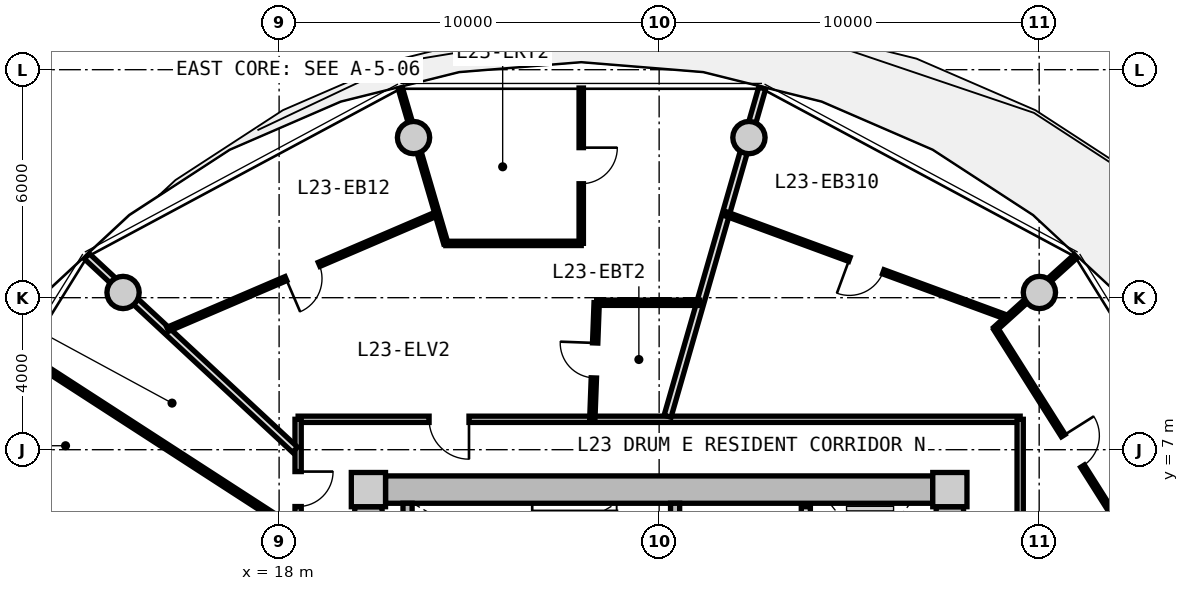
"""IFC4 building model, lengths in metres.
Left out: names, types, materials, properties, quantities, classifications, styles, units other than length and angle.
Written with IfcOpenShell. Run it as: python <this file> out.ifc"""

import sys

from ifc_helpers import new_model, si_unit, direction, frame, frame_2d, origin, origin_2d, place, context, subcontext, project, spatial, rectangle, circle, extrude, source, transform, mapped, element, fill, save


model = new_model("IFC4")
c1 = context("Model", 3, precision=1e-05, world=origin(), true_north=direction((0.0, 1.0)))
c2 = subcontext(c1, "Body", "Model", "MODEL_VIEW")
j1 = project(units=[si_unit("LENGTHUNIT", "METRE"), si_unit("PLANEANGLEUNIT", "RADIAN")], contexts=[c1])
p1 = place(None, origin())
s1 = spatial("IfcSite", under=j1, at=p1, CompositionType="ELEMENT")
p2 = place(p1, origin())
s2 = spatial("IfcBuilding", under=s1, at=p2, CompositionType="ELEMENT")
p3 = place(p2, frame((0.0, 0.0, 77.95)))
s3 = spatial("IfcBuildingStorey", under=s2, at=p3, CompositionType="ELEMENT", Elevation=77.95)
m1 = source(origin(), c2, "Body", "SweptSolid", [
    extrude(rectangle(XDim=0.9, YDim=0.9, at=origin_2d()), origin(), (0.0, 0.0, 1.0), 3.05),
])
for number, where, z_axis, x_axis in (
    (1, (35.65, 5.95, 0.0), (0.0, 0.0, 1.0), (1.0, 0.0, 0.0)),
    (2, (20.35, 5.95, 0.0), (0.0, 0.0, 1.0), (1.0, 0.0, 0.0)),
):
    element("IfcColumn", number, at=place(p3, frame(where, z_axis=z_axis, x_axis=x_axis)), inside=s3, PredefinedType="COLUMN", context=c2, shape_type="MappedRepresentation", body=[
        mapped(m1, transform((0.0, 0.0, 0.0), x_axis=(1.0, 0.0, 0.0), y_axis=(0.0, 1.0, 0.0), z_axis=(0.0, 0.0, 1.0), scale=1.0)),
    ])
m2 = source(origin(), c2, "Body", "SweptSolid", [
    extrude(rectangle(XDim=14.4, YDim=0.72, at=frame_2d((7.2, 0.0))), origin(), (0.0, 0.0, 1.0), 2.79),
])
p4 = place(p3, frame((20.8, 5.95, 0.0), z_axis=(0.0, 0.0, 1.0), x_axis=(1.0, 0.0, 0.0)))
e3 = element("IfcWall", 3, at=p4, inside=s3, PredefinedType="SHEAR", context=c2, shape_type="MappedRepresentation", body=[
    mapped(m2, transform((0.0, 0.0, 0.0), x_axis=(1.0, 0.0, 0.0), y_axis=(0.0, 1.0, 0.0), z_axis=(0.0, 0.0, 1.0), scale=1.0)),
])
m3 = source(origin(), c2, "Body", "SweptSolid", [
    extrude(rectangle(XDim=11.0, YDim=0.72, at=frame_2d((5.5, 0.0))), origin(), (0.0, 0.0, 1.0), 2.79),
])
p5 = place(p3, frame((20.35, -5.5, 0.0), z_axis=(0.0, 0.0, 1.0), x_axis=(0.0, 1.0, 0.0)))
e4 = element("IfcWall", 4, at=p5, inside=s3, PredefinedType="SHEAR", context=c2, shape_type="MappedRepresentation", body=[
    mapped(m3, transform((0.0, 0.0, 0.0), x_axis=(1.0, 0.0, 0.0), y_axis=(0.0, 1.0, 0.0), z_axis=(0.0, 0.0, 1.0), scale=1.0)),
])
p6 = place(p5, frame((3.8, 0.0, 0.0)))
e5 = element("IfcOpeningElement", 5, at=p6, cuts=e4, PredefinedType="OPENING", context=c2, shape_type="SweptSolid", body=[
    extrude(rectangle(XDim=1.2, YDim=2.15, at=frame_2d((0.6, 1.075))), frame((0.0, 0.37, 0.0), z_axis=(0.0, -1.0, 0.0), x_axis=(1.0, 0.0, 0.0)), (0.0, 0.0, 1.0), 0.74),
])
p7 = place(p3, frame((35.65, 5.5, 0.0), z_axis=(0.0, 0.0, 1.0), x_axis=(0.0, -1.0, 0.0)))
e6 = element("IfcWall", 6, at=p7, inside=s3, PredefinedType="SHEAR", context=c2, shape_type="MappedRepresentation", body=[
    mapped(m3, transform((0.0, 0.0, 0.0), x_axis=(1.0, 0.0, 0.0), y_axis=(0.0, 1.0, 0.0), z_axis=(0.0, 0.0, 1.0), scale=1.0)),
])
p8 = place(p7, frame((5.65, 0.0, 0.0)))
e7 = element("IfcOpeningElement", 7, at=p8, cuts=e6, PredefinedType="OPENING", context=c2, shape_type="SweptSolid", body=[
    extrude(rectangle(XDim=1.2, YDim=2.15, at=frame_2d((0.6, 1.075))), frame((0.0, 0.37, 0.0), z_axis=(0.0, -1.0, 0.0), x_axis=(1.0, 0.0, 0.0)), (0.0, 0.0, 1.0), 0.74),
])
p9 = place(p7, frame((9.3, 0.0, 0.0)))
e8 = element("IfcOpeningElement", 8, at=p9, cuts=e6, PredefinedType="OPENING", context=c2, shape_type="SweptSolid", body=[
    extrude(rectangle(XDim=1.0, YDim=2.1, at=frame_2d((0.5, 1.05))), frame((0.0, 0.37, 0.0), z_axis=(0.0, -1.0, 0.0), x_axis=(1.0, 0.0, 0.0)), (0.0, 0.0, 1.0), 0.74),
])
m4 = source(origin(), c2, "Body", "SweptSolid", [
    extrude(circle(Radius=0.425, at=origin_2d()), origin(), (0.0, 0.0, 1.0), 3.47),
])
for number, where, z_axis, x_axis in (
    (9, (38.006, 11.137, -0.42), (0.0, 0.0, 1.0), (1.0, 0.0, 0.0)),
    (10, (30.363, 15.213, -0.42), (0.0, 0.0, 1.0), (1.0, 0.0, 0.0)),
    (11, (21.537, 15.213, -0.42), (0.0, 0.0, 1.0), (1.0, 0.0, 0.0)),
    (12, (13.894, 11.137, -0.42), (0.0, 0.0, 1.0), (1.0, 0.0, 0.0)),
):
    element("IfcColumn", number, at=place(p3, frame(where, z_axis=z_axis, x_axis=x_axis)), inside=s3, PredefinedType="COLUMN", context=c2, shape_type="MappedRepresentation", body=[
        mapped(m4, transform((0.0, 0.0, 0.0), x_axis=(1.0, 0.0, 0.0), y_axis=(0.0, 1.0, 0.0), z_axis=(0.0, 0.0, 1.0), scale=1.0)),
    ])
m5 = source(origin(), c2, "Body", "SweptSolid", [
    extrude(rectangle(XDim=3.14, YDim=0.24, at=frame_2d((1.57, 0.0))), origin(), (0.0, 0.0, 1.0), 2.79),
])
p10 = place(p3, frame((21.38, 2.45, 0.0), z_axis=(0.0, 0.0, 1.0), x_axis=(0.0, 1.0, 0.0)))
e13 = element("IfcWall", 13, at=p10, inside=s3, PredefinedType="PARTITIONING", context=c2, shape_type="MappedRepresentation", body=[
    mapped(m5, transform((0.0, 0.0, 0.0), x_axis=(1.0, 0.0, 0.0), y_axis=(0.0, 1.0, 0.0), z_axis=(0.0, 0.0, 1.0), scale=1.0)),
])
p11 = place(p3, frame((28.42, 2.45, 0.0), z_axis=(0.0, 0.0, 1.0), x_axis=(0.0, 1.0, 0.0)))
e14 = element("IfcWall", 14, at=p11, inside=s3, PredefinedType="PARTITIONING", context=c2, shape_type="MappedRepresentation", body=[
    mapped(m5, transform((0.0, 0.0, 0.0), x_axis=(1.0, 0.0, 0.0), y_axis=(0.0, 1.0, 0.0), z_axis=(0.0, 0.0, 1.0), scale=1.0)),
])
p12 = place(p11, frame((0.55, 0.0, 0.0)))
e15 = element("IfcOpeningElement", 15, at=p12, cuts=e14, PredefinedType="OPENING", context=c2, shape_type="SweptSolid", body=[
    extrude(rectangle(XDim=1.1, YDim=2.15, at=frame_2d((0.55, 1.075))), frame((0.0, 0.13, 0.0), z_axis=(0.0, -1.0, 0.0), x_axis=(1.0, 0.0, 0.0)), (0.0, 0.0, 1.0), 0.26),
])
m6 = source(origin(), c2, "Body", "SweptSolid", [
    extrude(rectangle(XDim=5.0, YDim=0.24, at=frame_2d((2.5, 0.0))), origin(), (0.0, 0.0, 1.0), 2.775),
])
p13 = place(p3, frame((31.86, 0.5, 0.0), z_axis=(0.0, 0.0, 1.0), x_axis=(0.0, 1.0, 0.0)))
e16 = element("IfcWall", 16, at=p13, inside=s3, PredefinedType="PARTITIONING", context=c2, shape_type="MappedRepresentation", body=[
    mapped(m6, transform((0.0, 0.0, 0.0), x_axis=(1.0, 0.0, 0.0), y_axis=(0.0, 1.0, 0.0), z_axis=(0.0, 0.0, 1.0), scale=1.0)),
])
p14 = place(p13, frame((3.05, 0.0, 0.0)))
e17 = element("IfcOpeningElement", 17, at=p14, cuts=e16, PredefinedType="OPENING", context=c2, shape_type="SweptSolid", body=[
    extrude(rectangle(XDim=1.3, YDim=2.2, at=frame_2d((0.65, 1.1))), frame((0.0, 0.13, 0.0), z_axis=(0.0, -1.0, 0.0), x_axis=(1.0, 0.0, 0.0)), (0.0, 0.0, 1.0), 0.26),
])
p15 = place(p13, frame((0.55, 0.0, 0.0)))
e18 = element("IfcOpeningElement", 18, at=p15, cuts=e16, PredefinedType="OPENING", context=c2, shape_type="SweptSolid", body=[
    extrude(rectangle(XDim=1.3, YDim=2.2, at=frame_2d((0.65, 1.1))), frame((0.0, 0.13, 0.0), z_axis=(0.0, -1.0, 0.0), x_axis=(1.0, 0.0, 0.0)), (0.0, 0.0, 1.0), 0.26),
])
m7 = source(origin(), c2, "Body", "SweptSolid", [
    extrude(rectangle(XDim=19.0, YDim=0.165, at=frame_2d((9.5, 0.0))), origin(), (0.0, 0.0, 1.0), 2.775),
])
p16 = place(p3, frame((18.5, 7.8, 0.0), z_axis=(0.0, 0.0, 1.0), x_axis=(1.0, 0.0, 0.0)))
e19 = element("IfcWall", 19, at=p16, inside=s3, PredefinedType="PARTITIONING", context=c2, shape_type="MappedRepresentation", body=[
    mapped(m7, transform((0.0, 0.0, 0.0), x_axis=(1.0, 0.0, 0.0), y_axis=(0.0, 1.0, 0.0), z_axis=(0.0, 0.0, 1.0), scale=1.0)),
])
p17 = place(p16, frame((3.446, 0.0, 0.0)))
e20 = element("IfcOpeningElement", 20, at=p17, cuts=e19, PredefinedType="OPENING", context=c2, shape_type="SweptSolid", body=[
    extrude(rectangle(XDim=1.05, YDim=2.15, at=frame_2d((0.525, 1.075))), frame((0.0, 0.093, 0.0), z_axis=(0.0, -1.0, 0.0), x_axis=(1.0, 0.0, 0.0)), (0.0, 0.0, 1.0), 0.185),
])
m8 = source(origin(), c2, "Body", "SweptSolid", [
    extrude(rectangle(XDim=15.6, YDim=0.165, at=frame_2d((7.8, 0.0))), origin(), (0.0, 0.0, 1.0), 2.775),
])
p18 = place(p3, frame((18.5, -7.8, 0.0), z_axis=(0.0, 0.0, 1.0), x_axis=(0.0, 1.0, 0.0)))
e21 = element("IfcWall", 21, at=p18, inside=s3, PredefinedType="PARTITIONING", context=c2, shape_type="MappedRepresentation", body=[
    mapped(m8, transform((0.0, 0.0, 0.0), x_axis=(1.0, 0.0, 0.0), y_axis=(0.0, 1.0, 0.0), z_axis=(0.0, 0.0, 1.0), scale=1.0)),
])
p19 = place(p18, frame((13.304, 0.0, 0.0)))
e22 = element("IfcOpeningElement", 22, at=p19, cuts=e21, PredefinedType="OPENING", context=c2, shape_type="SweptSolid", body=[
    extrude(rectangle(XDim=0.92, YDim=2.1, at=frame_2d((0.46, 1.05))), frame((0.0, 0.093, 0.0), z_axis=(0.0, -1.0, 0.0), x_axis=(1.0, 0.0, 0.0)), (0.0, 0.0, 1.0), 0.185),
])
p20 = place(p18, frame((10.69, 0.0, 0.0)))
e23 = element("IfcOpeningElement", 23, at=p20, cuts=e21, PredefinedType="OPENING", context=c2, shape_type="SweptSolid", body=[
    extrude(rectangle(XDim=0.92, YDim=2.1, at=frame_2d((0.46, 1.05))), frame((0.0, 0.093, 0.0), z_axis=(0.0, -1.0, 0.0), x_axis=(1.0, 0.0, 0.0)), (0.0, 0.0, 1.0), 0.185),
])
p21 = place(p18, frame((7.175, 0.0, 0.0)))
e24 = element("IfcOpeningElement", 24, at=p21, cuts=e21, PredefinedType="OPENING", context=c2, shape_type="SweptSolid", body=[
    extrude(rectangle(XDim=1.25, YDim=2.2, at=frame_2d((0.625, 1.1))), frame((0.0, 0.093, 0.0), z_axis=(0.0, -1.0, 0.0), x_axis=(1.0, 0.0, 0.0)), (0.0, 0.0, 1.0), 0.185),
])
p22 = place(p18, frame((2.686, 0.0, 0.0)))
e25 = element("IfcOpeningElement", 25, at=p22, cuts=e21, PredefinedType="OPENING", context=c2, shape_type="SweptSolid", body=[
    extrude(rectangle(XDim=1.25, YDim=2.2, at=frame_2d((0.625, 1.1))), frame((0.0, 0.093, 0.0), z_axis=(0.0, -1.0, 0.0), x_axis=(1.0, 0.0, 0.0)), (0.0, 0.0, 1.0), 0.185),
])
p23 = place(p3, frame((37.5, 7.8, 0.0), z_axis=(0.0, 0.0, 1.0), x_axis=(0.0, -1.0, 0.0)))
e26 = element("IfcWall", 26, at=p23, inside=s3, PredefinedType="PARTITIONING", context=c2, shape_type="MappedRepresentation", body=[
    mapped(m8, transform((0.0, 0.0, 0.0), x_axis=(1.0, 0.0, 0.0), y_axis=(0.0, 1.0, 0.0), z_axis=(0.0, 0.0, 1.0), scale=1.0)),
])
p24 = place(p23, frame((6.87, 0.0, 0.0)))
e27 = element("IfcOpeningElement", 27, at=p24, cuts=e26, PredefinedType="OPENING", context=c2, shape_type="SweptSolid", body=[
    extrude(rectangle(XDim=1.05, YDim=2.15, at=frame_2d((0.525, 1.075))), frame((0.0, 0.093, 0.0), z_axis=(0.0, -1.0, 0.0), x_axis=(1.0, 0.0, 0.0)), (0.0, 0.0, 1.0), 0.185),
])
m9 = source(origin(), c2, "Body", "SweptSolid", [
    extrude(rectangle(XDim=8.989, YDim=0.19, at=frame_2d((4.495, 0.0))), origin(), (0.0, 0.0, 1.0), 2.275),
])
p25 = place(p3, frame((28.222, 7.88, 0.0), z_axis=(0.0, 0.0, 1.0), x_axis=(0.27702323008, 0.960863221274, 0.0)))
e28 = element("IfcWall", 28, at=p25, inside=s3, PredefinedType="PARTITIONING", context=c2, shape_type="MappedRepresentation", body=[
    mapped(m9, transform((0.0, 0.0, 0.0), x_axis=(1.0, 0.0, 0.0), y_axis=(0.0, 1.0, 0.0), z_axis=(0.0, 0.0, 1.0), scale=1.0)),
])
m10 = source(origin(), c2, "Body", "SweptSolid", [
    extrude(rectangle(XDim=7.618, YDim=0.115, at=frame_2d((3.809, 0.0))), origin(), (0.0, 0.0, 1.0), 2.775),
])
p26 = place(p3, frame((40.923, 3.749, 0.0), z_axis=(0.0, 0.0, 1.0), x_axis=(-0.534316104929, 0.845284744931, 0.0)))
e29 = element("IfcWall", 29, at=p26, inside=s3, PredefinedType="PARTITIONING", context=c2, shape_type="MappedRepresentation", body=[
    mapped(m10, transform((0.0, 0.0, 0.0), x_axis=(1.0, 0.0, 0.0), y_axis=(0.0, 1.0, 0.0), z_axis=(0.0, 0.0, 1.0), scale=1.0)),
])
p27 = place(p26, frame((3.334, 0.0, 0.0)))
e30 = element("IfcOpeningElement", 30, at=p27, cuts=e29, PredefinedType="OPENING", context=c2, shape_type="SweptSolid", body=[
    extrude(rectangle(XDim=0.95, YDim=2.1, at=frame_2d((0.475, 1.05))), frame((0.0, 0.067, 0.0), z_axis=(0.0, -1.0, 0.0), x_axis=(1.0, 0.0, 0.0)), (0.0, 0.0, 1.0), 0.135),
])
m11 = source(origin(), c2, "Body", "SweptSolid", [
    extrude(rectangle(XDim=7.913, YDim=0.115, at=frame_2d((3.956, 0.0))), origin(), (0.0, 0.0, 1.0), 2.775),
])
p28 = place(p3, frame((37.164, 10.479, 0.0), z_axis=(0.0, 0.0, 1.0), x_axis=(-0.938495791702, 0.345290673141, 0.0)))
e31 = element("IfcWall", 31, at=p28, inside=s3, PredefinedType="PARTITIONING", context=c2, shape_type="MappedRepresentation", body=[
    mapped(m11, transform((0.0, 0.0, 0.0), x_axis=(1.0, 0.0, 0.0), y_axis=(0.0, 1.0, 0.0), z_axis=(0.0, 0.0, 1.0), scale=1.0)),
])
p29 = place(p28, frame((3.481, 0.0, 0.0)))
e32 = element("IfcOpeningElement", 32, at=p29, cuts=e31, PredefinedType="OPENING", context=c2, shape_type="SweptSolid", body=[
    extrude(rectangle(XDim=0.95, YDim=2.1, at=frame_2d((0.475, 1.05))), frame((0.0, 0.067, 0.0), z_axis=(0.0, -1.0, 0.0), x_axis=(1.0, 0.0, 0.0)), (0.0, 0.0, 1.0), 0.135),
])
m12 = source(origin(), c2, "Body", "SweptSolid", [
    extrude(rectangle(XDim=2.852, YDim=0.115, at=frame_2d((1.426, 0.0))), origin(), (0.0, 0.0, 1.0), 2.275),
])
p30 = place(p3, frame((36.844, 10.18, 0.0), z_axis=(0.0, 0.0, 1.0), x_axis=(0.742190556634, 0.670188911908, 0.0)))
e33 = element("IfcWall", 33, at=p30, inside=s3, PredefinedType="PARTITIONING", context=c2, shape_type="MappedRepresentation", body=[
    mapped(m12, transform((0.0, 0.0, 0.0), x_axis=(1.0, 0.0, 0.0), y_axis=(0.0, 1.0, 0.0), z_axis=(0.0, 0.0, 1.0), scale=1.0)),
])
m13 = source(origin(), c2, "Body", "SweptSolid", [
    extrude(rectangle(XDim=7.482, YDim=0.19, at=frame_2d((3.741, 0.0))), origin(), (0.0, 0.0, 1.0), 2.275),
])
p31 = place(p3, frame((18.42, 6.998, 0.0), z_axis=(0.0, 0.0, 1.0), x_axis=(-0.732508698043, 0.680757671489, 0.0)))
e34 = element("IfcWall", 34, at=p31, inside=s3, PredefinedType="PARTITIONING", context=c2, shape_type="MappedRepresentation", body=[
    mapped(m13, transform((0.0, 0.0, 0.0), x_axis=(1.0, 0.0, 0.0), y_axis=(0.0, 1.0, 0.0), z_axis=(0.0, 0.0, 1.0), scale=1.0)),
])
m14 = source(origin(), c2, "Body", "SweptSolid", [
    extrude(rectangle(XDim=7.718, YDim=0.115, at=frame_2d((3.859, 0.0))), origin(), (0.0, 0.0, 1.0), 2.775),
])
p32 = place(p3, frame((22.162, 13.212, 0.0), z_axis=(0.0, 0.0, 1.0), x_axis=(-0.918922357854, -0.394438461912, 0.0)))
e35 = element("IfcWall", 35, at=p32, inside=s3, PredefinedType="PARTITIONING", context=c2, shape_type="MappedRepresentation", body=[
    mapped(m14, transform((0.0, 0.0, 0.0), x_axis=(1.0, 0.0, 0.0), y_axis=(0.0, 1.0, 0.0), z_axis=(0.0, 0.0, 1.0), scale=1.0)),
])
p33 = place(p32, frame((3.384, 0.0, 0.0)))
e36 = element("IfcOpeningElement", 36, at=p33, cuts=e35, PredefinedType="OPENING", context=c2, shape_type="SweptSolid", body=[
    extrude(rectangle(XDim=0.95, YDim=2.1, at=frame_2d((0.475, 1.05))), frame((0.0, 0.067, 0.0), z_axis=(0.0, -1.0, 0.0), x_axis=(1.0, 0.0, 0.0)), (0.0, 0.0, 1.0), 0.135),
])
m15 = source(origin(), c2, "Body", "SweptSolid", [
    extrude(rectangle(XDim=4.259, YDim=0.115, at=frame_2d((2.129, 0.0))), origin(), (0.0, 0.0, 1.0), 2.275),
])
p34 = place(p3, frame((22.386, 12.431, 0.0), z_axis=(0.0, 0.0, 1.0), x_axis=(-0.281309574539, 0.959617071166, 0.0)))
e37 = element("IfcWall", 37, at=p34, inside=s3, PredefinedType="PARTITIONING", context=c2, shape_type="MappedRepresentation", body=[
    mapped(m15, transform((0.0, 0.0, 0.0), x_axis=(1.0, 0.0, 0.0), y_axis=(0.0, 1.0, 0.0), z_axis=(0.0, 0.0, 1.0), scale=1.0)),
])
m16 = source(origin(), c2, "Body", "SweptSolid", [
    extrude(rectangle(XDim=3.04, YDim=0.14, at=frame_2d((1.52, 0.0))), origin(), (0.0, 0.0, 1.0), 2.775),
])
p35 = place(p3, frame((26.243, 7.83, 0.0), z_axis=(0.0, 0.0, 1.0), x_axis=(0.037347338878, 0.999302344778, 0.0)))
e38 = element("IfcWall", 38, at=p35, inside=s3, PredefinedType="PARTITIONING", context=c2, shape_type="MappedRepresentation", body=[
    mapped(m16, transform((0.0, 0.0, 0.0), x_axis=(1.0, 0.0, 0.0), y_axis=(0.0, 1.0, 0.0), z_axis=(0.0, 0.0, 1.0), scale=1.0)),
])
p36 = place(p35, frame((1.06, 0.0, 0.0)))
e39 = element("IfcOpeningElement", 39, at=p36, cuts=e38, PredefinedType="OPENING", context=c2, shape_type="SweptSolid", body=[
    extrude(rectangle(XDim=0.92, YDim=2.1, at=frame_2d((0.46, 1.05))), frame((0.0, 0.08, 0.0), z_axis=(0.0, -1.0, 0.0), x_axis=(1.0, 0.0, 0.0)), (0.0, 0.0, 1.0), 0.16),
])
m17 = source(origin(), c2, "Body", "SweptSolid", [
    extrude(rectangle(XDim=2.709, YDim=0.14, at=frame_2d((1.355, 0.0))), origin(), (0.0, 0.0, 1.0), 2.775),
])
p37 = place(p3, frame((26.356, 10.868, 0.0), z_axis=(0.0, 0.0, 1.0), x_axis=(0.999999853855, -0.000540637874, 0.0)))
e40 = element("IfcWall", 40, at=p37, inside=s3, PredefinedType="PARTITIONING", context=c2, shape_type="MappedRepresentation", body=[
    mapped(m17, transform((0.0, 0.0, 0.0), x_axis=(1.0, 0.0, 0.0), y_axis=(0.0, 1.0, 0.0), z_axis=(0.0, 0.0, 1.0), scale=1.0)),
])
m18 = source(origin(), c2, "Body", "SweptSolid", [
    extrude(rectangle(XDim=4.087, YDim=0.115, at=frame_2d((2.043, 0.0))), origin(), (0.0, 0.0, 1.0), 2.775),
])
p38 = place(p3, frame((25.95, 12.43, 0.0), z_axis=(0.0, 0.0, 1.0), x_axis=(0.0, 1.0, 0.0)))
e41 = element("IfcWall", 41, at=p38, inside=s3, PredefinedType="PARTITIONING", context=c2, shape_type="MappedRepresentation", body=[
    mapped(m18, transform((0.0, 0.0, 0.0), x_axis=(1.0, 0.0, 0.0), y_axis=(0.0, 1.0, 0.0), z_axis=(0.0, 0.0, 1.0), scale=1.0)),
])
p39 = place(p38, frame((1.569, 0.0, 0.0)))
e42 = element("IfcOpeningElement", 42, at=p39, cuts=e41, PredefinedType="OPENING", context=c2, shape_type="SweptSolid", body=[
    extrude(rectangle(XDim=0.95, YDim=2.1, at=frame_2d((0.475, 1.05))), frame((0.0, 0.067, 0.0), z_axis=(0.0, -1.0, 0.0), x_axis=(1.0, 0.0, 0.0)), (0.0, 0.0, 1.0), 0.135),
])
m19 = source(origin(), c2, "Body", "SweptSolid", [
    extrude(rectangle(XDim=3.563, YDim=0.115, at=frame_2d((1.782, 0.0))), origin(), (0.0, 0.0, 1.0), 2.775),
])
p40 = place(p3, frame((25.95, 12.43, 0.0), z_axis=(0.0, 0.0, 1.0), x_axis=(-0.99999971602, -0.000753630918, 0.0)))
e43 = element("IfcWall", 43, at=p40, inside=s3, PredefinedType="PARTITIONING", context=c2, shape_type="MappedRepresentation", body=[
    mapped(m19, transform((0.0, 0.0, 0.0), x_axis=(1.0, 0.0, 0.0), y_axis=(0.0, 1.0, 0.0), z_axis=(0.0, 0.0, 1.0), scale=1.0)),
])
m20 = source(origin(), c2, "Body", "SweptSolid", [
    extrude(rectangle(XDim=8.516, YDim=0.14, at=frame_2d((4.258, 0.0))), origin(), (0.0, 0.0, 1.0), 2.775),
])
p41 = place(p3, frame((18.47, 4.858, 0.0), z_axis=(0.0, 0.0, 1.0), x_axis=(-0.83954092961, 0.543296445331, 0.0)))
e44 = element("IfcWall", 44, at=p41, inside=s3, PredefinedType="PARTITIONING", context=c2, shape_type="MappedRepresentation", body=[
    mapped(m20, transform((0.0, 0.0, 0.0), x_axis=(1.0, 0.0, 0.0), y_axis=(0.0, 1.0, 0.0), z_axis=(0.0, 0.0, 1.0), scale=1.0)),
])
m21 = source(origin(), c2, "Body", "SweptSolid", [
    extrude(rectangle(XDim=0.95, YDim=2.1, at=frame_2d((0.475, 1.05))), frame((0.0, 0.025, 0.0), z_axis=(0.0, -1.0, 0.0), x_axis=(1.0, 0.0, 0.0)), (0.0, 0.0, 1.0), 0.05),
])
p42 = place(p27, frame((0.95, 0.0, 0.0), z_axis=(0.0, 0.0, 1.0), x_axis=(-1.0, 0.0, 0.0)))
e45 = element("IfcDoor", 45, at=p42, inside=s3, OperationType="SINGLE_SWING_LEFT", PredefinedType="DOOR", context=c2, shape_type="MappedRepresentation", body=[
    mapped(m21, transform((0.0, 0.0, 0.0), x_axis=(1.0, 0.0, 0.0), y_axis=(0.0, 1.0, 0.0), z_axis=(0.0, 0.0, 1.0), scale=1.0)),
])
fill(e30, e45)
p43 = place(p29, origin())
e46 = element("IfcDoor", 46, at=p43, inside=s3, OperationType="SINGLE_SWING_RIGHT", PredefinedType="DOOR", context=c2, shape_type="MappedRepresentation", body=[
    mapped(m21, transform((0.0, 0.0, 0.0), x_axis=(1.0, 0.0, 0.0), y_axis=(0.0, 1.0, 0.0), z_axis=(0.0, 0.0, 1.0), scale=1.0)),
])
fill(e32, e46)
m22 = source(origin(), c2, "Body", "SweptSolid", [
    extrude(rectangle(XDim=1.05, YDim=2.15, at=frame_2d((0.525, 1.075))), frame((0.0, 0.025, 0.0), z_axis=(0.0, -1.0, 0.0), x_axis=(1.0, 0.0, 0.0)), (0.0, 0.0, 1.0), 0.05),
])
p44 = place(p17, frame((1.05, 0.0, 0.0), z_axis=(0.0, 0.0, 1.0), x_axis=(-1.0, 0.0, 0.0)))
e47 = element("IfcDoor", 47, at=p44, inside=s3, OperationType="SINGLE_SWING_LEFT", PredefinedType="DOOR", context=c2, shape_type="MappedRepresentation", body=[
    mapped(m22, transform((0.0, 0.0, 0.0), x_axis=(1.0, 0.0, 0.0), y_axis=(0.0, 1.0, 0.0), z_axis=(0.0, 0.0, 1.0), scale=1.0)),
])
fill(e20, e47)
m23 = source(origin(), c2, "Body", "SweptSolid", [
    extrude(rectangle(XDim=0.92, YDim=2.1, at=frame_2d((0.46, 1.05))), frame((0.0, 0.025, 0.0), z_axis=(0.0, -1.0, 0.0), x_axis=(1.0, 0.0, 0.0)), (0.0, 0.0, 1.0), 0.05),
])
p45 = place(p36, origin())
e48 = element("IfcDoor", 48, at=p45, inside=s3, OperationType="SINGLE_SWING_RIGHT", PredefinedType="DOOR", context=c2, shape_type="MappedRepresentation", body=[
    mapped(m23, transform((0.0, 0.0, 0.0), x_axis=(1.0, 0.0, 0.0), y_axis=(0.0, 1.0, 0.0), z_axis=(0.0, 0.0, 1.0), scale=1.0)),
])
fill(e39, e48)
p46 = place(p39, frame((0.95, 0.0, 0.0), z_axis=(0.0, 0.0, 1.0), x_axis=(-1.0, 0.0, 0.0)))
e49 = element("IfcDoor", 49, at=p46, inside=s3, OperationType="SINGLE_SWING_LEFT", PredefinedType="DOOR", context=c2, shape_type="MappedRepresentation", body=[
    mapped(m21, transform((0.0, 0.0, 0.0), x_axis=(1.0, 0.0, 0.0), y_axis=(0.0, 1.0, 0.0), z_axis=(0.0, 0.0, 1.0), scale=1.0)),
])
fill(e42, e49)
p47 = place(p33, origin())
e50 = element("IfcDoor", 50, at=p47, inside=s3, OperationType="SINGLE_SWING_RIGHT", PredefinedType="DOOR", context=c2, shape_type="MappedRepresentation", body=[
    mapped(m21, transform((0.0, 0.0, 0.0), x_axis=(1.0, 0.0, 0.0), y_axis=(0.0, 1.0, 0.0), z_axis=(0.0, 0.0, 1.0), scale=1.0)),
])
fill(e36, e50)
p48 = place(p19, frame((0.92, 0.0, 0.0), z_axis=(0.0, 0.0, 1.0), x_axis=(-1.0, 0.0, 0.0)))
e51 = element("IfcDoor", 51, at=p48, inside=s3, OperationType="SINGLE_SWING_LEFT", PredefinedType="DOOR", context=c2, shape_type="MappedRepresentation", body=[
    mapped(m23, transform((0.0, 0.0, 0.0), x_axis=(1.0, 0.0, 0.0), y_axis=(0.0, 1.0, 0.0), z_axis=(0.0, 0.0, 1.0), scale=1.0)),
])
fill(e22, e51)
save(model, sys.argv[1])
